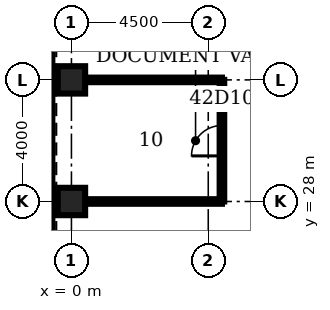
"""IFC4 building model, lengths in metres.
Left out: names, types, materials, properties, quantities, classifications, styles, units other than length and angle.
Written with IfcOpenShell. Run it as: python <this file> out.ifc"""

import sys

from ifc_helpers import new_model, si_unit, direction, frame, frame_2d, origin, origin_2d, place, context, subcontext, project, spatial, rectangle, hollow_rectangle, extrude, element, fill, save


model = new_model("IFC4")
c1 = context("Model", 3, precision=1e-05, world=origin(), true_north=direction((0.0, 1.0)))
c2 = subcontext(c1, "Body", "Model", "MODEL_VIEW")
j1 = project(units=[si_unit("LENGTHUNIT", "METRE"), si_unit("PLANEANGLEUNIT", "RADIAN")], contexts=[c1])
p1 = place(None, origin())
s1 = spatial("IfcSite", under=j1, at=p1, CompositionType="ELEMENT")
p2 = place(p1, origin())
s2 = spatial("IfcBuilding", under=s1, at=p2, CompositionType="ELEMENT")
p3 = place(p2, frame((0.0, 0.0, 190.0)))
s3 = spatial("IfcBuildingStorey", under=s2, at=p3, CompositionType="ELEMENT", Elevation=190.0)
for number, where, z_axis, x_axis in (
    (1, (0.0, 32.0, 0.0), (0.0, 0.0, 1.0), (1.0, 0.0, 0.0)),
    (2, (0.0, 28.0, 0.0), (0.0, 0.0, 1.0), (1.0, 0.0, 0.0)),
):
    element("IfcColumn", number, at=place(p3, frame(where, z_axis=z_axis, x_axis=x_axis)), inside=s3, PredefinedType="COLUMN", context=c2, shape_type="SweptSolid", body=[
        extrude(hollow_rectangle(XDim=0.9, YDim=0.9, WallThickness=0.09, at=origin_2d()), origin(), (0.0, 0.0, 1.0), 4.2),
    ])
for number, where, z_axis, x_axis in (
    (3, (0.45, 28.0, 0.0), (0.0, 0.0, 1.0), (1.0, 0.0, 0.0)),
    (4, (0.45, 32.0, 0.0), (0.0, 0.0, 1.0), (1.0, 0.0, 0.0)),
):
    element("IfcWall", number, at=place(p3, frame(where, z_axis=z_axis, x_axis=x_axis)), inside=s3, PredefinedType="PARTITIONING", context=c2, shape_type="SweptSolid", body=[
        extrude(rectangle(XDim=4.5, YDim=0.15, at=frame_2d((2.25, 0.0))), origin(), (0.0, 0.0, 1.0), 3.0),
    ])
p4 = place(p3, frame((4.95, 28.0, 0.0), z_axis=(0.0, 0.0, 1.0), x_axis=(0.0, 1.0, 0.0)))
e5 = element("IfcWall", 5, at=p4, inside=s3, PredefinedType="PARTITIONING", context=c2, shape_type="SweptSolid", body=[
    extrude(rectangle(XDim=4.0, YDim=0.15, at=frame_2d((2.0, 0.0))), origin(), (0.0, 0.0, 1.0), 3.0),
])
p5 = place(p4, frame((1.5, 0.0, 0.0)))
e6 = element("IfcOpeningElement", 6, at=p5, cuts=e5, PredefinedType="OPENING", context=c2, shape_type="SweptSolid", body=[
    extrude(rectangle(XDim=1.0, YDim=2.1, at=frame_2d((0.5, 1.05))), frame((0.0, 0.085, 0.0), z_axis=(0.0, -1.0, 0.0), x_axis=(1.0, 0.0, 0.0)), (0.0, 0.0, 1.0), 0.17),
])
p6 = place(p5, origin())
e7 = element("IfcDoor", 7, at=p6, inside=s3, OperationType="SINGLE_SWING_LEFT", PredefinedType="DOOR", context=c2, shape_type="SweptSolid", body=[
    extrude(rectangle(XDim=1.0, YDim=2.1, at=frame_2d((0.5, 1.05))), frame((0.0, 0.025, 0.0), z_axis=(0.0, -1.0, 0.0), x_axis=(1.0, 0.0, 0.0)), (0.0, 0.0, 1.0), 0.05),
])
fill(e6, e7)
save(model, sys.argv[1])
